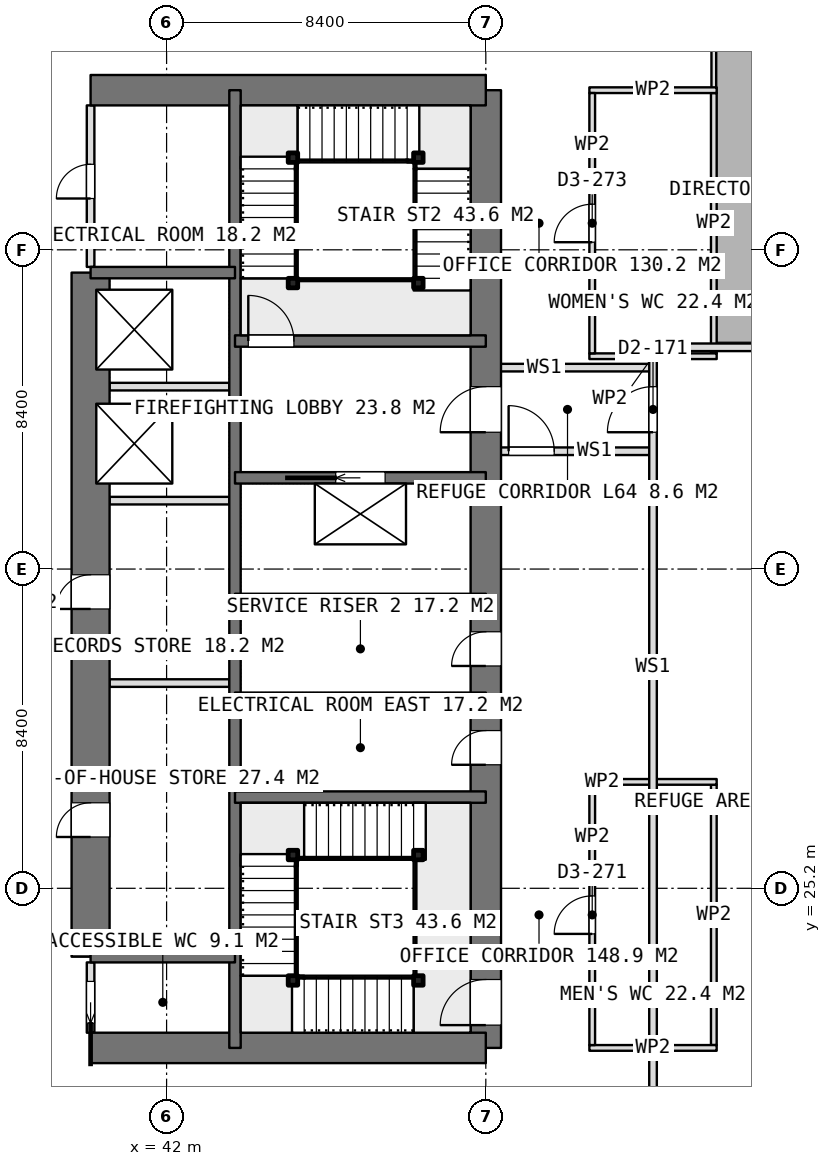
"""IFC4 building model, lengths in metres.
Left out: names, types, materials, properties, quantities, classifications, styles, units other than length and angle.
Written with IfcOpenShell. Run it as: python <this file> out.ifc"""

import sys

from ifc_helpers import new_model, si_unit, direction, frame, frame_2d, origin, origin_2d, place, context, subcontext, project, spatial, rectangle, extrude, element, fill, save


model = new_model("IFC4")
c1 = context("Model", 3, precision=1e-05, world=origin(), true_north=direction((0.0, 1.0)))
c2 = subcontext(c1, "Body", "Model", "MODEL_VIEW")
j1 = project(units=[si_unit("LENGTHUNIT", "METRE"), si_unit("PLANEANGLEUNIT", "RADIAN")], contexts=[c1])
p1 = place(None, origin())
s1 = spatial("IfcSite", under=j1, at=p1, CompositionType="ELEMENT")
p2 = place(p1, origin())
s2 = spatial("IfcBuilding", under=s1, at=p2, CompositionType="ELEMENT")
p3 = place(p2, frame((0.0, 0.0, 253.85)))
s3 = spatial("IfcBuildingStorey", under=s2, at=p3, CompositionType="ELEMENT", Elevation=253.85)
for number, where, z_axis, x_axis in (
    (1, (40.0, 21.0, 0.0), (0.0, 0.0, 1.0), (1.0, 0.0, 0.0)),
    (2, (40.0, 46.2, 0.0), (0.0, 0.0, 1.0), (1.0, 0.0, 0.0)),
):
    element("IfcWall", number, at=place(p3, frame(where, z_axis=z_axis, x_axis=x_axis)), inside=s3, PredefinedType="SHEAR", context=c2, shape_type="SweptSolid", body=[
        extrude(rectangle(XDim=10.4, YDim=0.8, at=frame_2d((5.2, 0.0))), origin(), (0.0, 0.0, 1.0), 3.75),
    ])
p4 = place(p3, frame((50.4, 21.0, 0.0), z_axis=(0.0, 0.0, 1.0), x_axis=(0.0, 1.0, 0.0)))
e3 = element("IfcWall", 3, at=p4, inside=s3, PredefinedType="SHEAR", context=c2, shape_type="SweptSolid", body=[
    extrude(rectangle(XDim=25.2, YDim=0.8, at=frame_2d((12.6, 0.0))), origin(), (0.0, 0.0, 1.0), 3.75),
])
p5 = place(p4, frame((16.2, 0.0, 0.0)))
e4 = element("IfcOpeningElement", 4, at=p5, cuts=e3, PredefinedType="OPENING", context=c2, shape_type="SweptSolid", body=[
    extrude(rectangle(XDim=1.2, YDim=2.1, at=frame_2d((0.6, 1.05))), frame((0.0, 0.41, 0.0), z_axis=(0.0, -1.0, 0.0), x_axis=(1.0, 0.0, 0.0)), (0.0, 0.0, 1.0), 0.82),
])
p6 = place(p4, frame((10.05, 0.0, 0.0)))
e5 = element("IfcOpeningElement", 5, at=p6, cuts=e3, PredefinedType="OPENING", context=c2, shape_type="SweptSolid", body=[
    extrude(rectangle(XDim=0.9, YDim=2.1, at=frame_2d((0.45, 1.05))), frame((0.0, 0.41, 0.0), z_axis=(0.0, -1.0, 0.0), x_axis=(1.0, 0.0, 0.0)), (0.0, 0.0, 1.0), 0.82),
])
p7 = place(p4, frame((7.45, 0.0, 0.0)))
e6 = element("IfcOpeningElement", 6, at=p7, cuts=e3, PredefinedType="OPENING", context=c2, shape_type="SweptSolid", body=[
    extrude(rectangle(XDim=0.9, YDim=2.1, at=frame_2d((0.45, 1.05))), frame((0.0, 0.41, 0.0), z_axis=(0.0, -1.0, 0.0), x_axis=(1.0, 0.0, 0.0)), (0.0, 0.0, 1.0), 0.82),
])
p8 = place(p4, frame((0.6, 0.0, 0.0)))
e7 = element("IfcOpeningElement", 7, at=p8, cuts=e3, PredefinedType="OPENING", context=c2, shape_type="SweptSolid", body=[
    extrude(rectangle(XDim=1.2, YDim=2.1, at=frame_2d((0.6, 1.05))), frame((0.0, 0.41, 0.0), z_axis=(0.0, -1.0, 0.0), x_axis=(1.0, 0.0, 0.0)), (0.0, 0.0, 1.0), 0.82),
])
p9 = place(p3, frame((43.8, 21.0, 0.0), z_axis=(0.0, 0.0, 1.0), x_axis=(0.0, 1.0, 0.0)))
e8 = element("IfcWall", 8, at=p9, inside=s3, PredefinedType="SHEAR", context=c2, shape_type="SweptSolid", body=[
    extrude(rectangle(XDim=25.2, YDim=0.3, at=frame_2d((12.6, 0.0))), origin(), (0.0, 0.0, 1.0), 3.75),
])
p10 = place(p3, frame((40.0, 23.4, 0.0), z_axis=(0.0, 0.0, 1.0), x_axis=(0.0, 1.0, 0.0)))
e9 = element("IfcWall", 9, at=p10, inside=s3, PredefinedType="SHEAR", context=c2, shape_type="SweptSolid", body=[
    extrude(rectangle(XDim=18.0, YDim=1.0, at=frame_2d((9.0, 0.0))), origin(), (0.0, 0.0, 1.0), 3.75),
])
p11 = place(p10, frame((3.15, 0.0, 0.0)))
e10 = element("IfcOpeningElement", 10, at=p11, cuts=e9, PredefinedType="OPENING", context=c2, shape_type="SweptSolid", body=[
    extrude(rectangle(XDim=0.9, YDim=2.1, at=frame_2d((0.45, 1.05))), frame((0.0, 0.51, 0.0), z_axis=(0.0, -1.0, 0.0), x_axis=(1.0, 0.0, 0.0)), (0.0, 0.0, 1.0), 1.02),
])
p12 = place(p10, frame((9.15, 0.0, 0.0)))
e11 = element("IfcOpeningElement", 11, at=p12, cuts=e9, PredefinedType="OPENING", context=c2, shape_type="SweptSolid", body=[
    extrude(rectangle(XDim=0.9, YDim=2.1, at=frame_2d((0.45, 1.05))), frame((0.0, 0.51, 0.0), z_axis=(0.0, -1.0, 0.0), x_axis=(1.0, 0.0, 0.0)), (0.0, 0.0, 1.0), 1.02),
])
for number, where, z_axis, x_axis in (
    (12, (40.0, 23.4, 0.0), (0.0, 0.0, 1.0), (1.0, 0.0, 0.0)),
    (13, (40.0, 41.4, 0.0), (0.0, 0.0, 1.0), (1.0, 0.0, 0.0)),
):
    element("IfcWall", number, at=place(p3, frame(where, z_axis=z_axis, x_axis=x_axis)), inside=s3, PredefinedType="SHEAR", context=c2, shape_type="SweptSolid", body=[
        extrude(rectangle(XDim=3.8, YDim=0.3, at=frame_2d((1.9, 0.0))), origin(), (0.0, 0.0, 1.0), 3.75),
    ])
for number, where, z_axis, x_axis in (
    (14, (43.8, 27.6, 0.0), (0.0, 0.0, 1.0), (1.0, 0.0, 0.0)),
    (15, (43.8, 30.2, 0.0), (0.0, 0.0, 1.0), (1.0, 0.0, 0.0)),
    (16, (43.8, 32.8, 0.0), (0.0, 0.0, 1.0), (1.0, 0.0, 0.0)),
):
    element("IfcWall", number, at=place(p3, frame(where, z_axis=z_axis, x_axis=x_axis)), inside=s3, PredefinedType="SHEAR", context=c2, shape_type="SweptSolid", body=[
        extrude(rectangle(XDim=6.6, YDim=0.3, at=frame_2d((3.3, 0.0))), origin(), (0.0, 0.0, 1.0), 3.75),
    ])
p13 = place(p3, frame((43.8, 36.0, 0.0), z_axis=(0.0, 0.0, 1.0), x_axis=(1.0, 0.0, 0.0)))
e17 = element("IfcWall", 17, at=p13, inside=s3, PredefinedType="SHEAR", context=c2, shape_type="SweptSolid", body=[
    extrude(rectangle(XDim=6.6, YDim=0.3, at=frame_2d((3.3, 0.0))), origin(), (0.0, 0.0, 1.0), 3.75),
])
p14 = place(p13, frame((2.65, 0.0, 0.0)))
e18 = element("IfcOpeningElement", 18, at=p14, cuts=e17, PredefinedType="OPENING", context=c2, shape_type="SweptSolid", body=[
    extrude(rectangle(XDim=1.3, YDim=2.1, at=frame_2d((0.65, 1.05))), frame((0.0, 0.16, 0.0), z_axis=(0.0, -1.0, 0.0), x_axis=(1.0, 0.0, 0.0)), (0.0, 0.0, 1.0), 0.32),
])
p15 = place(p3, frame((43.8, 39.6, 0.0), z_axis=(0.0, 0.0, 1.0), x_axis=(1.0, 0.0, 0.0)))
e19 = element("IfcWall", 19, at=p15, inside=s3, PredefinedType="SHEAR", context=c2, shape_type="SweptSolid", body=[
    extrude(rectangle(XDim=6.6, YDim=0.3, at=frame_2d((3.3, 0.0))), origin(), (0.0, 0.0, 1.0), 3.75),
])
p16 = place(p15, frame((0.35, 0.0, 0.0)))
e20 = element("IfcOpeningElement", 20, at=p16, cuts=e19, PredefinedType="OPENING", context=c2, shape_type="SweptSolid", body=[
    extrude(rectangle(XDim=1.2, YDim=2.1, at=frame_2d((0.6, 1.05))), frame((0.0, 0.16, 0.0), z_axis=(0.0, -1.0, 0.0), x_axis=(1.0, 0.0, 0.0)), (0.0, 0.0, 1.0), 0.32),
])
for number, where, z_axis, x_axis in (
    (21, (40.5, 35.4, 0.0), (0.0, 0.0, 1.0), (1.0, 0.0, 0.0)),
    (22, (40.5, 38.4, 0.0), (0.0, 0.0, 1.0), (1.0, 0.0, 0.0)),
):
    element("IfcWall", number, at=place(p3, frame(where, z_axis=z_axis, x_axis=x_axis)), inside=s3, PredefinedType="PARTITIONING", context=c2, shape_type="SweptSolid", body=[
        extrude(rectangle(XDim=3.15, YDim=0.2, at=frame_2d((1.575, 0.0))), origin(), (0.0, 0.0, 1.0), 3.5),
    ])
p17 = place(p3, frame((40.0, 21.4, 0.0), z_axis=(0.0, 0.0, 1.0), x_axis=(0.0, 1.0, 0.0)))
e23 = element("IfcWall", 23, at=p17, inside=s3, PredefinedType="PARTITIONING", context=c2, shape_type="SweptSolid", body=[
    extrude(rectangle(XDim=1.85, YDim=0.2, at=frame_2d((0.925, 0.0))), origin(), (0.0, 0.0, 1.0), 3.5),
])
p18 = place(p17, frame((0.25, 0.0, 0.0)))
e24 = element("IfcOpeningElement", 24, at=p18, cuts=e23, PredefinedType="OPENING", context=c2, shape_type="SweptSolid", body=[
    extrude(rectangle(XDim=1.1, YDim=2.1, at=frame_2d((0.55, 1.05))), frame((0.0, 0.11, 0.0), z_axis=(0.0, -1.0, 0.0), x_axis=(1.0, 0.0, 0.0)), (0.0, 0.0, 1.0), 0.22),
])
p19 = place(p3, frame((40.0, 41.55, 0.0), z_axis=(0.0, 0.0, 1.0), x_axis=(0.0, 1.0, 0.0)))
e25 = element("IfcWall", 25, at=p19, inside=s3, PredefinedType="PARTITIONING", context=c2, shape_type="SweptSolid", body=[
    extrude(rectangle(XDim=4.25, YDim=0.2, at=frame_2d((2.125, 0.0))), origin(), (0.0, 0.0, 1.0), 3.5),
])
p20 = place(p19, frame((1.8, 0.0, 0.0)))
e26 = element("IfcOpeningElement", 26, at=p20, cuts=e25, PredefinedType="OPENING", context=c2, shape_type="SweptSolid", body=[
    extrude(rectangle(XDim=0.9, YDim=2.1, at=frame_2d((0.45, 1.05))), frame((0.0, 0.11, 0.0), z_axis=(0.0, -1.0, 0.0), x_axis=(1.0, 0.0, 0.0)), (0.0, 0.0, 1.0), 0.22),
])
p21 = place(p3, frame((40.5, 30.6, 0.0), z_axis=(0.0, 0.0, 1.0), x_axis=(1.0, 0.0, 0.0)))
e27 = element("IfcWall", 27, at=p21, inside=s3, PredefinedType="PARTITIONING", context=c2, shape_type="SweptSolid", body=[
    extrude(rectangle(XDim=3.15, YDim=0.2, at=frame_2d((1.575, 0.0))), origin(), (0.0, 0.0, 1.0), 3.5),
])
for number, where, z_axis, x_axis in (
    (28, (53.125, 39.2, 0.0), (0.0, 0.0, 1.0), (1.0, 0.0, 0.0)),
    (29, (53.125, 46.2, 0.0), (0.0, 0.0, 1.0), (1.0, 0.0, 0.0)),
):
    element("IfcWall", number, at=place(p3, frame(where, z_axis=z_axis, x_axis=x_axis)), inside=s3, PredefinedType="PARTITIONING", context=c2, shape_type="SweptSolid", body=[
        extrude(rectangle(XDim=3.35, YDim=0.15, at=frame_2d((1.675, 0.0))), origin(), (0.0, 0.0, 1.0), 3.5),
    ])
p22 = place(p3, frame((53.2, 39.275, 0.0), z_axis=(0.0, 0.0, 1.0), x_axis=(0.0, 1.0, 0.0)))
e30 = element("IfcWall", 30, at=p22, inside=s3, PredefinedType="PARTITIONING", context=c2, shape_type="SweptSolid", body=[
    extrude(rectangle(XDim=6.85, YDim=0.15, at=frame_2d((3.425, 0.0))), origin(), (0.0, 0.0, 1.0), 3.5),
])
p23 = place(p22, frame((2.925, 0.0, 0.0)))
e31 = element("IfcOpeningElement", 31, at=p23, cuts=e30, PredefinedType="OPENING", context=c2, shape_type="SweptSolid", body=[
    extrude(rectangle(XDim=1.0, YDim=2.1, at=frame_2d((0.5, 1.05))), frame((0.0, 0.085, 0.0), z_axis=(0.0, -1.0, 0.0), x_axis=(1.0, 0.0, 0.0)), (0.0, 0.0, 1.0), 0.17),
])
p24 = place(p3, frame((56.4, 39.275, 0.0), z_axis=(0.0, 0.0, 1.0), x_axis=(0.0, 1.0, 0.0)))
e32 = element("IfcWall", 32, at=p24, inside=s3, PredefinedType="PARTITIONING", context=c2, shape_type="SweptSolid", body=[
    extrude(rectangle(XDim=6.85, YDim=0.15, at=frame_2d((3.425, 0.0))), origin(), (0.0, 0.0, 1.0), 3.5),
])
for number, where, z_axis, x_axis in (
    (33, (53.125, 21.0, 0.0), (0.0, 0.0, 1.0), (1.0, 0.0, 0.0)),
    (34, (53.125, 28.0, 0.0), (0.0, 0.0, 1.0), (1.0, 0.0, 0.0)),
):
    element("IfcWall", number, at=place(p3, frame(where, z_axis=z_axis, x_axis=x_axis)), inside=s3, PredefinedType="PARTITIONING", context=c2, shape_type="SweptSolid", body=[
        extrude(rectangle(XDim=3.35, YDim=0.15, at=frame_2d((1.675, 0.0))), origin(), (0.0, 0.0, 1.0), 3.5),
    ])
p25 = place(p3, frame((53.2, 21.075, 0.0), z_axis=(0.0, 0.0, 1.0), x_axis=(0.0, 1.0, 0.0)))
e35 = element("IfcWall", 35, at=p25, inside=s3, PredefinedType="PARTITIONING", context=c2, shape_type="SweptSolid", body=[
    extrude(rectangle(XDim=6.85, YDim=0.15, at=frame_2d((3.425, 0.0))), origin(), (0.0, 0.0, 1.0), 3.5),
])
p26 = place(p25, frame((2.925, 0.0, 0.0)))
e36 = element("IfcOpeningElement", 36, at=p26, cuts=e35, PredefinedType="OPENING", context=c2, shape_type="SweptSolid", body=[
    extrude(rectangle(XDim=1.0, YDim=2.1, at=frame_2d((0.5, 1.05))), frame((0.0, 0.085, 0.0), z_axis=(0.0, -1.0, 0.0), x_axis=(1.0, 0.0, 0.0)), (0.0, 0.0, 1.0), 0.17),
])
p27 = place(p3, frame((56.4, 21.075, 0.0), z_axis=(0.0, 0.0, 1.0), x_axis=(0.0, 1.0, 0.0)))
e37 = element("IfcWall", 37, at=p27, inside=s3, PredefinedType="PARTITIONING", context=c2, shape_type="SweptSolid", body=[
    extrude(rectangle(XDim=6.85, YDim=0.15, at=frame_2d((3.425, 0.0))), origin(), (0.0, 0.0, 1.0), 3.5),
])
p28 = place(p3, frame((56.4, 46.125, 0.0), z_axis=(0.0, 0.0, 1.0), x_axis=(0.0, 1.0, 0.0)))
e38 = element("IfcWall", 38, at=p28, inside=s3, PredefinedType="PARTITIONING", context=c2, shape_type="SweptSolid", body=[
    extrude(rectangle(XDim=3.025, YDim=0.125, at=frame_2d((1.512, 0.0))), origin(), (0.0, 0.0, 1.0), 3.5),
])
for number, where, z_axis, x_axis in (
    (39, (45.325, 41.125, 0.0), (0.0, 0.0, 1.0), (1.0, 0.0, 0.0)),
    (40, (45.325, 44.425, 0.0), (0.0, 0.0, 1.0), (1.0, 0.0, 0.0)),
    (41, (48.625, 44.425, 0.0), (0.0, 0.0, 1.0), (1.0, 0.0, 0.0)),
    (42, (48.625, 41.125, 0.0), (0.0, 0.0, 1.0), (1.0, 0.0, 0.0)),
    (43, (48.625, 22.775, 0.0), (0.0, 0.0, 1.0), (1.0, 0.0, 0.0)),
    (44, (45.325, 22.775, 0.0), (0.0, 0.0, 1.0), (1.0, 0.0, 0.0)),
    (45, (45.325, 26.075, 0.0), (0.0, 0.0, 1.0), (1.0, 0.0, 0.0)),
    (46, (48.625, 26.075, 0.0), (0.0, 0.0, 1.0), (1.0, 0.0, 0.0)),
):
    element("IfcColumn", number, at=place(p3, frame(where, z_axis=z_axis, x_axis=x_axis)), inside=s3, PredefinedType="COLUMN", context=c2, shape_type="SweptSolid", body=[
        extrude(rectangle(XDim=0.25, YDim=0.25, at=origin_2d()), origin(), (0.0, 0.0, 1.0), 3.75),
    ])
p29 = place(p3, frame((54.8, 15.602, 0.0), z_axis=(0.0, 0.0, 1.0), x_axis=(0.0, 1.0, 0.0)))
e47 = element("IfcWall", 47, at=p29, inside=s3, PredefinedType="PARTITIONING", context=c2, shape_type="SweptSolid", body=[
    extrude(rectangle(XDim=23.733, YDim=0.2, at=frame_2d((11.866, 0.0))), origin(), (0.0, 0.0, 1.0), 3.5),
])
p30 = place(p29, frame((21.598, 0.0, 0.0)))
e48 = element("IfcOpeningElement", 48, at=p30, cuts=e47, PredefinedType="OPENING", context=c2, shape_type="SweptSolid", body=[
    extrude(rectangle(XDim=1.2, YDim=2.1, at=frame_2d((0.6, 1.05))), frame((0.0, 0.11, 0.0), z_axis=(0.0, -1.0, 0.0), x_axis=(1.0, 0.0, 0.0)), (0.0, 0.0, 1.0), 0.22),
])
p31 = place(p3, frame((54.7, 39.435, 0.0), z_axis=(0.0, 0.0, 1.0), x_axis=(1.0, 0.0, 0.0)))
e49 = element("IfcWall", 49, at=p31, inside=s3, PredefinedType="PARTITIONING", context=c2, shape_type="SweptSolid", body=[
    extrude(rectangle(XDim=7.05, YDim=0.2, at=frame_2d((3.525, 0.0))), origin(), (0.0, 0.0, 1.0), 3.5),
])
p32 = place(p3, frame((50.4, 38.9, 0.0), z_axis=(0.0, 0.0, 1.0), x_axis=(1.0, 0.0, 0.0)))
e50 = element("IfcWall", 50, at=p32, inside=s3, PredefinedType="PARTITIONING", context=c2, shape_type="SweptSolid", body=[
    extrude(rectangle(XDim=4.4, YDim=0.2, at=frame_2d((2.2, 0.0))), origin(), (0.0, 0.0, 1.0), 3.5),
])
p33 = place(p3, frame((50.4, 36.7, 0.0), z_axis=(0.0, 0.0, 1.0), x_axis=(1.0, 0.0, 0.0)))
e51 = element("IfcWall", 51, at=p33, inside=s3, PredefinedType="PARTITIONING", context=c2, shape_type="SweptSolid", body=[
    extrude(rectangle(XDim=4.4, YDim=0.2, at=frame_2d((2.2, 0.0))), origin(), (0.0, 0.0, 1.0), 3.5),
])
p34 = place(p33, frame((0.6, 0.0, 0.0)))
e52 = element("IfcOpeningElement", 52, at=p34, cuts=e51, PredefinedType="OPENING", context=c2, shape_type="SweptSolid", body=[
    extrude(rectangle(XDim=1.2, YDim=2.1, at=frame_2d((0.6, 1.05))), frame((0.0, 0.11, 0.0), z_axis=(0.0, -1.0, 0.0), x_axis=(1.0, 0.0, 0.0)), (0.0, 0.0, 1.0), 0.22),
])
p35 = place(p5, origin())
e53 = element("IfcDoor", 53, at=p35, inside=s3, OperationType="SINGLE_SWING_LEFT", PredefinedType="DOOR", context=c2, shape_type="SweptSolid", body=[
    extrude(rectangle(XDim=1.2, YDim=2.1, at=frame_2d((0.6, 1.05))), frame((0.0, 0.025, 0.0), z_axis=(0.0, -1.0, 0.0), x_axis=(1.0, 0.0, 0.0)), (0.0, 0.0, 1.0), 0.05),
])
fill(e4, e53)
p36 = place(p6, origin())
e54 = element("IfcDoor", 54, at=p36, inside=s3, OperationType="SINGLE_SWING_LEFT", PredefinedType="DOOR", context=c2, shape_type="SweptSolid", body=[
    extrude(rectangle(XDim=0.9, YDim=2.1, at=frame_2d((0.45, 1.05))), frame((0.0, 0.025, 0.0), z_axis=(0.0, -1.0, 0.0), x_axis=(1.0, 0.0, 0.0)), (0.0, 0.0, 1.0), 0.05),
])
fill(e5, e54)
p37 = place(p7, origin())
e55 = element("IfcDoor", 55, at=p37, inside=s3, OperationType="SINGLE_SWING_LEFT", PredefinedType="DOOR", context=c2, shape_type="SweptSolid", body=[
    extrude(rectangle(XDim=0.9, YDim=2.1, at=frame_2d((0.45, 1.05))), frame((0.0, 0.025, 0.0), z_axis=(0.0, -1.0, 0.0), x_axis=(1.0, 0.0, 0.0)), (0.0, 0.0, 1.0), 0.05),
])
fill(e6, e55)
p38 = place(p18, origin())
e56 = element("IfcDoor", 56, at=p38, inside=s3, OperationType="SLIDING_TO_LEFT", PredefinedType="DOOR", context=c2, shape_type="SweptSolid", body=[
    extrude(rectangle(XDim=1.1, YDim=2.1, at=frame_2d((0.55, 1.05))), frame((0.0, 0.025, 0.0), z_axis=(0.0, -1.0, 0.0), x_axis=(1.0, 0.0, 0.0)), (0.0, 0.0, 1.0), 0.05),
])
fill(e24, e56)
p39 = place(p20, origin())
e57 = element("IfcDoor", 57, at=p39, inside=s3, OperationType="SINGLE_SWING_LEFT", PredefinedType="DOOR", context=c2, shape_type="SweptSolid", body=[
    extrude(rectangle(XDim=0.9, YDim=2.1, at=frame_2d((0.45, 1.05))), frame((0.0, 0.025, 0.0), z_axis=(0.0, -1.0, 0.0), x_axis=(1.0, 0.0, 0.0)), (0.0, 0.0, 1.0), 0.05),
])
fill(e26, e57)
p40 = place(p11, origin())
e58 = element("IfcDoor", 58, at=p40, inside=s3, OperationType="SINGLE_SWING_LEFT", PredefinedType="DOOR", context=c2, shape_type="SweptSolid", body=[
    extrude(rectangle(XDim=0.9, YDim=2.1, at=frame_2d((0.45, 1.05))), frame((0.0, 0.025, 0.0), z_axis=(0.0, -1.0, 0.0), x_axis=(1.0, 0.0, 0.0)), (0.0, 0.0, 1.0), 0.05),
])
fill(e10, e58)
p41 = place(p12, origin())
e59 = element("IfcDoor", 59, at=p41, inside=s3, OperationType="SINGLE_SWING_LEFT", PredefinedType="DOOR", context=c2, shape_type="SweptSolid", body=[
    extrude(rectangle(XDim=0.9, YDim=2.1, at=frame_2d((0.45, 1.05))), frame((0.0, 0.025, 0.0), z_axis=(0.0, -1.0, 0.0), x_axis=(1.0, 0.0, 0.0)), (0.0, 0.0, 1.0), 0.05),
])
fill(e11, e59)
p42 = place(p14, origin())
e60 = element("IfcDoor", 60, at=p42, inside=s3, OperationType="SLIDING_TO_LEFT", PredefinedType="USERDEFINED", context=c2, shape_type="SweptSolid", body=[
    extrude(rectangle(XDim=1.3, YDim=2.1, at=frame_2d((0.65, 1.05))), frame((0.0, 0.025, 0.0), z_axis=(0.0, -1.0, 0.0), x_axis=(1.0, 0.0, 0.0)), (0.0, 0.0, 1.0), 0.05),
])
fill(e18, e60)
p43 = place(p23, origin())
e61 = element("IfcDoor", 61, at=p43, inside=s3, OperationType="SINGLE_SWING_LEFT", PredefinedType="DOOR", context=c2, shape_type="SweptSolid", body=[
    extrude(rectangle(XDim=1.0, YDim=2.1, at=frame_2d((0.5, 1.05))), frame((0.0, 0.025, 0.0), z_axis=(0.0, -1.0, 0.0), x_axis=(1.0, 0.0, 0.0)), (0.0, 0.0, 1.0), 0.05),
])
fill(e31, e61)
p44 = place(p26, origin())
e62 = element("IfcDoor", 62, at=p44, inside=s3, OperationType="SINGLE_SWING_LEFT", PredefinedType="DOOR", context=c2, shape_type="SweptSolid", body=[
    extrude(rectangle(XDim=1.0, YDim=2.1, at=frame_2d((0.5, 1.05))), frame((0.0, 0.025, 0.0), z_axis=(0.0, -1.0, 0.0), x_axis=(1.0, 0.0, 0.0)), (0.0, 0.0, 1.0), 0.05),
])
fill(e36, e62)
p45 = place(p16, origin())
e63 = element("IfcDoor", 63, at=p45, inside=s3, OperationType="SINGLE_SWING_RIGHT", PredefinedType="DOOR", context=c2, shape_type="SweptSolid", body=[
    extrude(rectangle(XDim=1.2, YDim=2.1, at=frame_2d((0.6, 1.05))), frame((0.0, 0.025, 0.0), z_axis=(0.0, -1.0, 0.0), x_axis=(1.0, 0.0, 0.0)), (0.0, 0.0, 1.0), 0.05),
])
fill(e20, e63)
p46 = place(p8, origin())
e64 = element("IfcDoor", 64, at=p46, inside=s3, OperationType="SINGLE_SWING_RIGHT", PredefinedType="DOOR", context=c2, shape_type="SweptSolid", body=[
    extrude(rectangle(XDim=1.2, YDim=2.1, at=frame_2d((0.6, 1.05))), frame((0.0, 0.025, 0.0), z_axis=(0.0, -1.0, 0.0), x_axis=(1.0, 0.0, 0.0)), (0.0, 0.0, 1.0), 0.05),
])
fill(e7, e64)
p47 = place(p30, origin())
e65 = element("IfcDoor", 65, at=p47, inside=s3, OperationType="SINGLE_SWING_LEFT", PredefinedType="DOOR", context=c2, shape_type="SweptSolid", body=[
    extrude(rectangle(XDim=1.2, YDim=2.1, at=frame_2d((0.6, 1.05))), frame((0.0, 0.025, 0.0), z_axis=(0.0, -1.0, 0.0), x_axis=(1.0, 0.0, 0.0)), (0.0, 0.0, 1.0), 0.05),
])
fill(e48, e65)
p48 = place(p34, origin())
e66 = element("IfcDoor", 66, at=p48, inside=s3, OperationType="SINGLE_SWING_LEFT", PredefinedType="DOOR", context=c2, shape_type="SweptSolid", body=[
    extrude(rectangle(XDim=1.2, YDim=2.1, at=frame_2d((0.6, 1.05))), frame((0.0, 0.025, 0.0), z_axis=(0.0, -1.0, 0.0), x_axis=(1.0, 0.0, 0.0)), (0.0, 0.0, 1.0), 0.05),
])
fill(e52, e66)
save(model, sys.argv[1])
